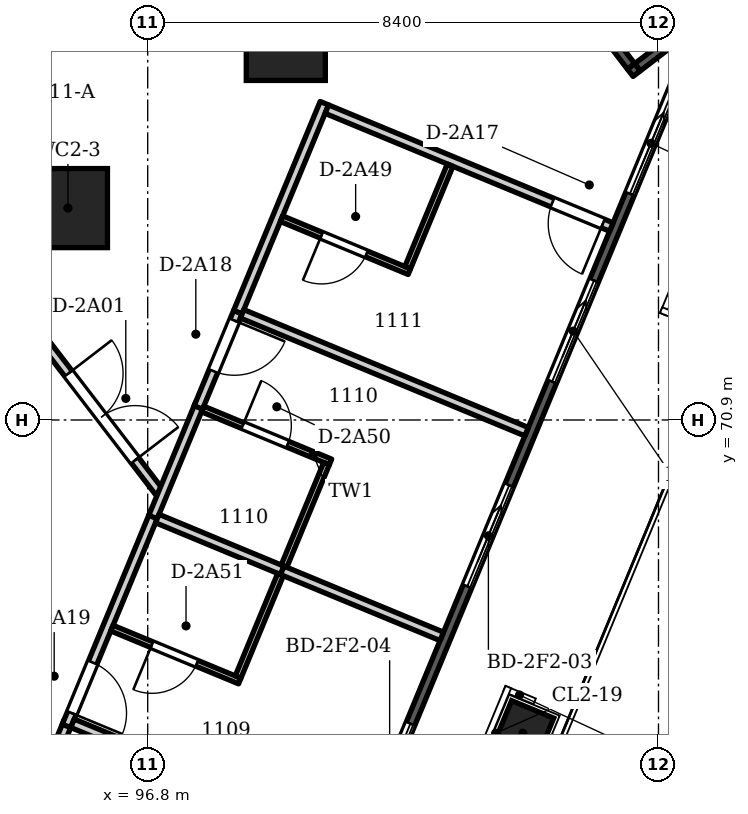
"""IFC4 building model, lengths in metres.
Left out: names, types, materials, properties, quantities, classifications, styles, units other than length and angle.
Written with IfcOpenShell. Run it as: python <this file> out.ifc"""

import sys

from ifc_helpers import new_model, si_unit, direction, frame, frame_2d, origin, origin_2d, place, context, subcontext, project, spatial, polyline, rectangle, circle, outline, extrude, element, fill, save


model = new_model("IFC4")
c1 = context("Model", 3, precision=1e-05, world=origin(), true_north=direction((0.0, 1.0)))
c2 = subcontext(c1, "Body", "Model", "MODEL_VIEW")
j1 = project(units=[si_unit("LENGTHUNIT", "METRE"), si_unit("PLANEANGLEUNIT", "RADIAN")], contexts=[c1])
p1 = place(None, origin())
s1 = spatial("IfcSite", under=j1, at=p1, CompositionType="ELEMENT")
p2 = place(p1, origin())
s2 = spatial("IfcBuilding", under=s1, at=p2, CompositionType="ELEMENT")
p3 = place(p2, frame((0.0, 0.0, 50.4)))
s3 = spatial("IfcBuildingStorey", under=s2, at=p3, CompositionType="ELEMENT", Elevation=50.4)
p4 = place(p3, frame((102.968, 65.749, -0.35), z_axis=(0.0, 0.0, 1.0), x_axis=(0.382683432365, 0.923879532511, 0.0)))
e1 = element("IfcColumn", 1, at=p4, inside=s3, PredefinedType="COLUMN", context=c2, shape_type="SweptSolid", body=[
    extrude(rectangle(XDim=0.85, YDim=0.75, at=origin_2d()), origin(), (0.0, 0.0, 1.0), 3.95),
])
for number, where, z_axis, x_axis in (
    (2, (95.488, 74.385, -0.35), (0.0, 0.0, 1.0), (1.0, 0.0, 0.0)),
    (3, (99.071, 77.134, -0.35), (0.0, 0.0, 1.0), (1.0, 0.0, 0.0)),
):
    element("IfcColumn", number, at=place(p3, frame(where, z_axis=z_axis, x_axis=x_axis)), inside=s3, PredefinedType="COLUMN", context=c2, shape_type="SweptSolid", body=[
        extrude(circle(Radius=0.65, at=origin_2d()), origin(), (0.0, 0.0, 1.0), 3.95),
    ])
p5 = place(p3, frame((104.208, 77.42, 0.0), z_axis=(0.0, 0.0, 1.0), x_axis=(0.608754453805, -0.793358692504, 0.0)))
e4 = element("IfcWall", 4, at=p5, inside=s3, PredefinedType="SOLIDWALL", context=c2, shape_type="SweptSolid", body=[
    extrude(outline(polyline([(0.89, 0.075), (0.0, 0.075), (0.0, -0.075), (0.89, -0.075), (0.89, 0.075)])), origin(), (0.0, 0.0, 1.0), 3.3),
])
p6 = place(p3, frame((104.768, 76.633, 0.0), z_axis=(0.0, 0.0, 1.0), x_axis=(0.793352136239, 0.608762998157, 0.0)))
e5 = element("IfcWall", 5, at=p6, inside=s3, PredefinedType="SOLIDWALL", context=c2, shape_type="SweptSolid", body=[
    extrude(outline(polyline([(0.11, 0.075), (0.11, -0.075), (1.196, -0.075), (1.196, 0.075), (0.11, 0.075)])), origin(), (0.0, 0.0, 1.0), 3.3),
])
p7 = place(p3, frame((105.889, 77.411, 0.0), z_axis=(0.0, 0.0, 1.0), x_axis=(-0.38268395344, -0.923879316675, 0.0)))
e6 = element("IfcWall", 6, at=p7, inside=s3, PredefinedType="SOLIDWALL", context=c2, shape_type="SweptSolid", body=[
    extrude(outline(polyline([(0.149, 0.075), (0.149, -0.075), (47.217, -0.075), (47.217, 0.075), (0.149, 0.075)])), origin(), (0.0, 0.0, 1.0), 3.3),
])
p8 = place(p7, frame((1.222, 0.0, 0.0)))
e7 = element("IfcOpeningElement", 7, at=p8, cuts=e6, PredefinedType="OPENING", context=c2, shape_type="SweptSolid", body=[
    extrude(rectangle(XDim=1.8, YDim=2.6, at=frame_2d((0.9, 1.3))), frame((0.0, 0.085, 0.0), z_axis=(0.0, -1.0, 0.0), x_axis=(1.0, 0.0, 0.0)), (0.0, 0.0, 1.0), 0.17),
])
p9 = place(p7, frame((4.565, 0.0, 0.0)))
e8 = element("IfcOpeningElement", 8, at=p9, cuts=e6, PredefinedType="OPENING", context=c2, shape_type="SweptSolid", body=[
    extrude(rectangle(XDim=1.8, YDim=2.6, at=frame_2d((0.9, 1.3))), frame((0.0, 0.085, 0.0), z_axis=(0.0, -1.0, 0.0), x_axis=(1.0, 0.0, 0.0)), (0.0, 0.0, 1.0), 0.17),
])
p10 = place(p7, frame((8.209, 0.0, 0.0)))
e9 = element("IfcOpeningElement", 9, at=p10, cuts=e6, PredefinedType="OPENING", context=c2, shape_type="SweptSolid", body=[
    extrude(rectangle(XDim=1.8, YDim=2.6, at=frame_2d((0.9, 1.3))), frame((0.0, 0.085, 0.0), z_axis=(0.0, -1.0, 0.0), x_axis=(1.0, 0.0, 0.0)), (0.0, 0.0, 1.0), 0.17),
])
p11 = place(p7, frame((12.453, 0.0, 0.0)))
e10 = element("IfcOpeningElement", 10, at=p11, cuts=e6, PredefinedType="OPENING", context=c2, shape_type="SweptSolid", body=[
    extrude(rectangle(XDim=1.8, YDim=2.6, at=frame_2d((0.9, 1.3))), frame((0.0, 0.085, 0.0), z_axis=(0.0, -1.0, 0.0), x_axis=(1.0, 0.0, 0.0)), (0.0, 0.0, 1.0), 0.17),
])
p12 = place(p7, frame((15.496, 0.0, 0.0)))
e11 = element("IfcOpeningElement", 11, at=p12, cuts=e6, PredefinedType="OPENING", context=c2, shape_type="SweptSolid", body=[
    extrude(rectangle(XDim=1.8, YDim=2.6, at=frame_2d((0.9, 1.3))), frame((0.0, 0.085, 0.0), z_axis=(0.0, -1.0, 0.0), x_axis=(1.0, 0.0, 0.0)), (0.0, 0.0, 1.0), 0.17),
])
p13 = place(p7, frame((18.84, 0.0, 0.15)))
e12 = element("IfcOpeningElement", 12, at=p13, cuts=e6, PredefinedType="OPENING", context=c2, shape_type="SweptSolid", body=[
    extrude(rectangle(XDim=2.4, YDim=2.45, at=frame_2d((1.2, 1.225))), frame((0.0, 0.085, 0.0), z_axis=(0.0, -1.0, 0.0), x_axis=(1.0, 0.0, 0.0)), (0.0, 0.0, 1.0), 0.17),
])
p14 = place(p7, frame((22.783, 0.0, 0.0)))
e13 = element("IfcOpeningElement", 13, at=p14, cuts=e6, PredefinedType="OPENING", context=c2, shape_type="SweptSolid", body=[
    extrude(rectangle(XDim=1.8, YDim=2.6, at=frame_2d((0.9, 1.3))), frame((0.0, 0.085, 0.0), z_axis=(0.0, -1.0, 0.0), x_axis=(1.0, 0.0, 0.0)), (0.0, 0.0, 1.0), 0.17),
])
p15 = place(p7, frame((26.127, 0.0, 0.15)))
e14 = element("IfcOpeningElement", 14, at=p15, cuts=e6, PredefinedType="OPENING", context=c2, shape_type="SweptSolid", body=[
    extrude(rectangle(XDim=2.4, YDim=2.45, at=frame_2d((1.2, 1.225))), frame((0.0, 0.085, 0.0), z_axis=(0.0, -1.0, 0.0), x_axis=(1.0, 0.0, 0.0)), (0.0, 0.0, 1.0), 0.17),
])
p16 = place(p7, frame((30.071, 0.0, 0.0)))
e15 = element("IfcOpeningElement", 15, at=p16, cuts=e6, PredefinedType="OPENING", context=c2, shape_type="SweptSolid", body=[
    extrude(rectangle(XDim=1.8, YDim=2.6, at=frame_2d((0.9, 1.3))), frame((0.0, 0.085, 0.0), z_axis=(0.0, -1.0, 0.0), x_axis=(1.0, 0.0, 0.0)), (0.0, 0.0, 1.0), 0.17),
])
p17 = place(p7, frame((33.114, 0.0, 0.0)))
e16 = element("IfcOpeningElement", 16, at=p17, cuts=e6, PredefinedType="OPENING", context=c2, shape_type="SweptSolid", body=[
    extrude(rectangle(XDim=1.8, YDim=2.6, at=frame_2d((0.9, 1.3))), frame((0.0, 0.085, 0.0), z_axis=(0.0, -1.0, 0.0), x_axis=(1.0, 0.0, 0.0)), (0.0, 0.0, 1.0), 0.17),
])
p18 = place(p7, frame((37.358, 0.0, 0.0)))
e17 = element("IfcOpeningElement", 17, at=p18, cuts=e6, PredefinedType="OPENING", context=c2, shape_type="SweptSolid", body=[
    extrude(rectangle(XDim=1.8, YDim=2.6, at=frame_2d((0.9, 1.3))), frame((0.0, 0.085, 0.0), z_axis=(0.0, -1.0, 0.0), x_axis=(1.0, 0.0, 0.0)), (0.0, 0.0, 1.0), 0.17),
])
p19 = place(p7, frame((41.001, 0.0, 0.0)))
e18 = element("IfcOpeningElement", 18, at=p19, cuts=e6, PredefinedType="OPENING", context=c2, shape_type="SweptSolid", body=[
    extrude(rectangle(XDim=1.8, YDim=2.6, at=frame_2d((0.9, 1.3))), frame((0.0, 0.085, 0.0), z_axis=(0.0, -1.0, 0.0), x_axis=(1.0, 0.0, 0.0)), (0.0, 0.0, 1.0), 0.17),
])
p20 = place(p7, frame((44.345, 0.0, 0.0)))
e19 = element("IfcOpeningElement", 19, at=p20, cuts=e6, PredefinedType="OPENING", context=c2, shape_type="SweptSolid", body=[
    extrude(rectangle(XDim=1.8, YDim=2.6, at=frame_2d((0.9, 1.3))), frame((0.0, 0.085, 0.0), z_axis=(0.0, -1.0, 0.0), x_axis=(1.0, 0.0, 0.0)), (0.0, 0.0, 1.0), 0.17),
])
p21 = place(p3, origin())
e20 = element("IfcWall", 20, at=p21, inside=s3, PredefinedType="PARAPET", context=c2, shape_type="SweptSolid", body=[
    extrude(outline(polyline([(97.885, 51.908), (112.536, 77.285), (112.189, 77.285), (98.764, 54.032), (97.885, 51.908)])), origin(), (0.0, 0.0, 1.0), 1.1),
])
p22 = place(p3, frame((91.474, 76.906, 0.0), z_axis=(0.0, 0.0, 1.0), x_axis=(0.608691769464, -0.793406787081, 0.0)))
e21 = element("IfcWall", 21, at=p22, inside=s3, PredefinedType="PARTITIONING", context=c2, shape_type="SweptSolid", body=[
    extrude(rectangle(XDim=9.059, YDim=0.15, at=frame_2d((4.53, 0.0))), origin(), (0.0, 0.0, 1.0), 2.75),
])
p23 = place(p22, frame((6.606, 0.0, 0.0)))
e22 = element("IfcOpeningElement", 22, at=p23, cuts=e21, PredefinedType="OPENING", context=c2, shape_type="SweptSolid", body=[
    extrude(rectangle(XDim=1.8, YDim=2.1, at=frame_2d((0.9, 1.05))), frame((0.0, 0.085, 0.0), z_axis=(0.0, -1.0, 0.0), x_axis=(1.0, 0.0, 0.0)), (0.0, 0.0, 1.0), 0.17),
])
p24 = place(p22, frame((0.554, 0.0, 0.0)))
e23 = element("IfcOpeningElement", 23, at=p24, cuts=e21, PredefinedType="OPENING", context=c2, shape_type="SweptSolid", body=[
    extrude(rectangle(XDim=0.8, YDim=2.1, at=frame_2d((0.4, 1.05))), frame((0.0, 0.085, 0.0), z_axis=(0.0, -1.0, 0.0), x_axis=(1.0, 0.0, 0.0)), (0.0, 0.0, 1.0), 0.17),
])
p25 = place(p3, frame((94.845, 64.373, 0.0), z_axis=(0.0, 0.0, 1.0), x_axis=(0.382668597728, 0.92388567708, 0.0)))
e24 = element("IfcWall", 24, at=p25, inside=s3, PredefinedType="PARTITIONING", context=c2, shape_type="SweptSolid", body=[
    extrude(rectangle(XDim=1.701, YDim=0.15, at=frame_2d((0.851, 0.0))), origin(), (0.0, 0.0, 1.0), 3.3),
])
p26 = place(p25, frame((0.203, 0.0, 0.0)))
e25 = element("IfcOpeningElement", 25, at=p26, cuts=e24, PredefinedType="OPENING", context=c2, shape_type="SweptSolid", body=[
    extrude(rectangle(XDim=0.9, YDim=2.1, at=frame_2d((0.45, 1.05))), frame((0.0, 0.085, 0.0), z_axis=(0.0, -1.0, 0.0), x_axis=(1.0, 0.0, 0.0)), (0.0, 0.0, 1.0), 0.17),
])
p27 = place(p3, frame((95.464, 65.868, 0.0), z_axis=(0.0, 0.0, 1.0), x_axis=(0.382444409481, 0.923978502811, 0.0)))
e26 = element("IfcWall", 26, at=p27, inside=s3, PredefinedType="PARTITIONING", context=c2, shape_type="SweptSolid", body=[
    extrude(rectangle(XDim=3.803, YDim=0.15, at=frame_2d((1.901, 0.0))), origin(), (0.0, 0.0, 1.0), 3.3),
])
p28 = place(p27, frame((0.229, 0.0, 0.0)))
e27 = element("IfcOpeningElement", 27, at=p28, cuts=e26, PredefinedType="OPENING", context=c2, shape_type="SweptSolid", body=[
    extrude(rectangle(XDim=0.9, YDim=2.1, at=frame_2d((0.45, 1.05))), frame((0.0, 0.085, 0.0), z_axis=(0.0, -1.0, 0.0), x_axis=(1.0, 0.0, 0.0)), (0.0, 0.0, 1.0), 0.17),
])
p29 = place(p3, frame((95.563, 65.912, 0.0), z_axis=(0.0, 0.0, 1.0), x_axis=(0.923879340067, -0.382683896966, 0.0)))
e28 = element("IfcWall", 28, at=p29, inside=s3, PredefinedType="PARTITIONING", context=c2, shape_type="SweptSolid", body=[
    extrude(rectangle(XDim=5.064, YDim=0.15, at=frame_2d((2.532, 0.0))), origin(), (0.0, 0.0, 1.0), 3.3),
])
p30 = place(p3, frame((96.211, 67.477, 0.0), z_axis=(0.0, 0.0, 1.0), x_axis=(0.923931833824, -0.382557141415, 0.0)))
e29 = element("IfcWall", 29, at=p30, inside=s3, PredefinedType="PARTITIONING", context=c2, shape_type="SweptSolid", body=[
    extrude(rectangle(XDim=2.275, YDim=0.1, at=frame_2d((1.138, 0.0))), origin(), (0.0, 0.0, 1.0), 3.3),
])
p31 = place(p30, frame((0.712, 0.0, 0.0)))
e30 = element("IfcOpeningElement", 30, at=p31, cuts=e29, PredefinedType="OPENING", context=c2, shape_type="SweptSolid", body=[
    extrude(rectangle(XDim=0.8, YDim=2.1, at=frame_2d((0.4, 1.05))), frame((0.0, 0.06, 0.0), z_axis=(0.0, -1.0, 0.0), x_axis=(1.0, 0.0, 0.0)), (0.0, 0.0, 1.0), 0.12),
])
p32 = place(p3, frame((96.887, 69.304, 0.0), z_axis=(0.0, 0.0, 1.0), x_axis=(0.382516455335, 0.923948678985, 0.0)))
e31 = element("IfcWall", 31, at=p32, inside=s3, PredefinedType="PARTITIONING", context=c2, shape_type="SweptSolid", body=[
    extrude(rectangle(XDim=2.008, YDim=0.15, at=frame_2d((1.004, 0.0))), origin(), (0.0, 0.0, 1.0), 3.3),
])
p33 = place(p3, frame((96.957, 69.279, 0.0), z_axis=(0.0, 0.0, 1.0), x_axis=(0.923750633898, -0.382994473033, 0.0)))
e32 = element("IfcWall", 32, at=p33, inside=s3, PredefinedType="PARTITIONING", context=c2, shape_type="SweptSolid", body=[
    extrude(rectangle(XDim=2.225, YDim=0.15, at=frame_2d((1.113, 0.0))), origin(), (0.0, 0.0, 1.0), 3.3),
])
p34 = place(p3, frame((97.633, 71.106, 0.0), z_axis=(0.0, 0.0, 1.0), x_axis=(0.382868343203, 0.923802918253, 0.0)))
e33 = element("IfcWall", 33, at=p34, inside=s3, PredefinedType="PARTITIONING", context=c2, shape_type="SweptSolid", body=[
    extrude(rectangle(XDim=1.698, YDim=0.15, at=frame_2d((0.849, 0.0))), origin(), (0.0, 0.0, 1.0), 3.3),
])
p35 = place(p34, frame((0.647, 0.0, 0.0)))
e34 = element("IfcOpeningElement", 34, at=p35, cuts=e33, PredefinedType="OPENING", context=c2, shape_type="SweptSolid", body=[
    extrude(rectangle(XDim=0.9, YDim=2.1, at=frame_2d((0.45, 1.05))), frame((0.0, 0.085, 0.0), z_axis=(0.0, -1.0, 0.0), x_axis=(1.0, 0.0, 0.0)), (0.0, 0.0, 1.0), 0.17),
])
p36 = place(p3, frame((97.704, 71.08, 0.0), z_axis=(0.0, 0.0, 1.0), x_axis=(0.923916126796, -0.382595073996, 0.0)))
e35 = element("IfcWall", 35, at=p36, inside=s3, PredefinedType="PARTITIONING", context=c2, shape_type="SweptSolid", body=[
    extrude(rectangle(XDim=2.275, YDim=0.1, at=frame_2d((1.137, 0.0))), origin(), (0.0, 0.0, 1.0), 3.3),
])
p37 = place(p36, frame((0.712, 0.0, 0.0)))
e36 = element("IfcOpeningElement", 36, at=p37, cuts=e35, PredefinedType="OPENING", context=c2, shape_type="SweptSolid", body=[
    extrude(rectangle(XDim=0.8, YDim=2.1, at=frame_2d((0.4, 1.05))), frame((0.0, 0.06, 0.0), z_axis=(0.0, -1.0, 0.0), x_axis=(1.0, 0.0, 0.0)), (0.0, 0.0, 1.0), 0.12),
])
p38 = place(p3, frame((98.286, 66.672, 0.0), z_axis=(0.0, 0.0, 1.0), x_axis=(0.382714221705, 0.923866778548, 0.0)))
e37 = element("IfcWall", 37, at=p38, inside=s3, PredefinedType="PARTITIONING", context=c2, shape_type="SweptSolid", body=[
    extrude(rectangle(XDim=1.824, YDim=0.1, at=frame_2d((0.912, 0.0))), origin(), (0.0, 0.0, 1.0), 3.3),
])
p39 = place(p3, frame((98.283, 72.674, 0.0), z_axis=(0.0, 0.0, 1.0), x_axis=(0.382661068861, 0.923888795461, 0.0)))
e38 = element("IfcWall", 38, at=p39, inside=s3, PredefinedType="PARTITIONING", context=c2, shape_type="SweptSolid", body=[
    extrude(rectangle(XDim=3.718, YDim=0.15, at=frame_2d((1.859, 0.0))), origin(), (0.0, 0.0, 1.0), 3.3),
])
p40 = place(p3, frame((98.352, 72.645, 0.0), z_axis=(0.0, 0.0, 1.0), x_axis=(0.923879340067, -0.382683896966, 0.0)))
e39 = element("IfcWall", 39, at=p40, inside=s3, PredefinedType="PARTITIONING", context=c2, shape_type="SweptSolid", body=[
    extrude(rectangle(XDim=5.064, YDim=0.15, at=frame_2d((2.532, 0.0))), origin(), (0.0, 0.0, 1.0), 3.3),
])
p41 = place(p3, frame((99.0, 74.21, 0.0), z_axis=(0.0, 0.0, 1.0), x_axis=(0.92378006954, -0.382923469012, 0.0)))
e40 = element("IfcWall", 40, at=p41, inside=s3, PredefinedType="PARTITIONING", context=c2, shape_type="SweptSolid", body=[
    extrude(rectangle(XDim=2.275, YDim=0.1, at=frame_2d((1.138, 0.0))), origin(), (0.0, 0.0, 1.0), 3.3),
])
p42 = place(p41, frame((0.713, 0.0, 0.0)))
e41 = element("IfcOpeningElement", 41, at=p42, cuts=e40, PredefinedType="OPENING", context=c2, shape_type="SweptSolid", body=[
    extrude(rectangle(XDim=0.8, YDim=2.1, at=frame_2d((0.4, 1.05))), frame((0.0, 0.06, 0.0), z_axis=(0.0, -1.0, 0.0), x_axis=(1.0, 0.0, 0.0)), (0.0, 0.0, 1.0), 0.12),
])
p43 = place(p3, frame((99.042, 68.496, 0.0), z_axis=(0.0, 0.0, 1.0), x_axis=(0.382981625731, 0.923755960388, 0.0)))
e42 = element("IfcWall", 42, at=p43, inside=s3, PredefinedType="PARTITIONING", context=c2, shape_type="SweptSolid", body=[
    extrude(rectangle(XDim=1.826, YDim=0.1, at=frame_2d((0.913, 0.0))), origin(), (0.0, 0.0, 1.0), 3.3),
])
p44 = place(p3, frame((99.013, 68.427, 0.0), z_axis=(0.0, 0.0, 1.0), x_axis=(0.923980158274, -0.382440409889, 0.0)))
e43 = element("IfcWall", 43, at=p44, inside=s3, PredefinedType="PARTITIONING", context=c2, shape_type="SweptSolid", body=[
    extrude(rectangle(XDim=2.839, YDim=0.15, at=frame_2d((1.419, 0.0))), origin(), (0.0, 0.0, 1.0), 3.3),
])
p45 = place(p3, frame((99.746, 76.011, 0.0), z_axis=(0.0, 0.0, 1.0), x_axis=(0.923879340067, -0.382683896966, 0.0)))
e44 = element("IfcWall", 44, at=p45, inside=s3, PredefinedType="PARTITIONING", context=c2, shape_type="SweptSolid", body=[
    extrude(rectangle(XDim=5.064, YDim=0.15, at=frame_2d((2.532, 0.0))), origin(), (0.0, 0.0, 1.0), 3.3),
])
p46 = place(p45, frame((4.014, 0.0, 0.0)))
e45 = element("IfcOpeningElement", 45, at=p46, cuts=e44, PredefinedType="OPENING", context=c2, shape_type="SweptSolid", body=[
    extrude(rectangle(XDim=0.9, YDim=2.1, at=frame_2d((0.45, 1.05))), frame((0.0, 0.085, 0.0), z_axis=(0.0, -1.0, 0.0), x_axis=(1.0, 0.0, 0.0)), (0.0, 0.0, 1.0), 0.17),
])
p47 = place(p3, frame((101.075, 73.404, 0.0), z_axis=(0.0, 0.0, 1.0), x_axis=(0.382410862233, 0.923992387656, 0.0)))
e46 = element("IfcWall", 46, at=p47, inside=s3, PredefinedType="PARTITIONING", context=c2, shape_type="SweptSolid", body=[
    extrude(rectangle(XDim=1.825, YDim=0.1, at=frame_2d((0.913, 0.0))), origin(), (0.0, 0.0, 1.0), 3.3),
])
p48 = place(p8, origin())
e47 = element("IfcDoor", 47, at=p48, inside=s3, OperationType="SLIDING_TO_LEFT", PredefinedType="DOOR", context=c2, shape_type="SweptSolid", body=[
    extrude(rectangle(XDim=1.8, YDim=2.6, at=frame_2d((0.9, 1.3))), frame((0.0, 0.025, 0.0), z_axis=(0.0, -1.0, 0.0), x_axis=(1.0, 0.0, 0.0)), (0.0, 0.0, 1.0), 0.05),
])
fill(e7, e47)
p49 = place(p9, origin())
e48 = element("IfcDoor", 48, at=p49, inside=s3, OperationType="SLIDING_TO_LEFT", PredefinedType="DOOR", context=c2, shape_type="SweptSolid", body=[
    extrude(rectangle(XDim=1.8, YDim=2.6, at=frame_2d((0.9, 1.3))), frame((0.0, 0.025, 0.0), z_axis=(0.0, -1.0, 0.0), x_axis=(1.0, 0.0, 0.0)), (0.0, 0.0, 1.0), 0.05),
])
fill(e8, e48)
p50 = place(p10, origin())
e49 = element("IfcDoor", 49, at=p50, inside=s3, OperationType="SLIDING_TO_LEFT", PredefinedType="DOOR", context=c2, shape_type="SweptSolid", body=[
    extrude(rectangle(XDim=1.8, YDim=2.6, at=frame_2d((0.9, 1.3))), frame((0.0, 0.025, 0.0), z_axis=(0.0, -1.0, 0.0), x_axis=(1.0, 0.0, 0.0)), (0.0, 0.0, 1.0), 0.05),
])
fill(e9, e49)
p51 = place(p11, origin())
e50 = element("IfcDoor", 50, at=p51, inside=s3, OperationType="SLIDING_TO_LEFT", PredefinedType="DOOR", context=c2, shape_type="SweptSolid", body=[
    extrude(rectangle(XDim=1.8, YDim=2.6, at=frame_2d((0.9, 1.3))), frame((0.0, 0.025, 0.0), z_axis=(0.0, -1.0, 0.0), x_axis=(1.0, 0.0, 0.0)), (0.0, 0.0, 1.0), 0.05),
])
fill(e10, e50)
p52 = place(p23, origin())
e51 = element("IfcDoor", 51, at=p52, inside=s3, OperationType="DOUBLE_DOOR_DOUBLE_SWING", PredefinedType="DOOR", context=c2, shape_type="SweptSolid", body=[
    extrude(rectangle(XDim=1.8, YDim=2.1, at=frame_2d((0.9, 1.05))), frame((0.0, 0.025, 0.0), z_axis=(0.0, -1.0, 0.0), x_axis=(1.0, 0.0, 0.0)), (0.0, 0.0, 1.0), 0.05),
])
fill(e22, e51)
p53 = place(p46, frame((0.9, 0.0, 0.0), z_axis=(0.0, 0.0, 1.0), x_axis=(-1.0, 0.0, 0.0)))
e52 = element("IfcDoor", 52, at=p53, inside=s3, OperationType="SINGLE_SWING_LEFT", PredefinedType="DOOR", context=c2, shape_type="SweptSolid", body=[
    extrude(rectangle(XDim=0.9, YDim=2.1, at=frame_2d((0.45, 1.05))), frame((0.0, 0.025, 0.0), z_axis=(0.0, -1.0, 0.0), x_axis=(1.0, 0.0, 0.0)), (0.0, 0.0, 1.0), 0.05),
])
fill(e45, e52)
p54 = place(p35, frame((0.9, 0.0, 0.0), z_axis=(0.0, 0.0, 1.0), x_axis=(-1.0, 0.0, 0.0)))
e53 = element("IfcDoor", 53, at=p54, inside=s3, OperationType="SINGLE_SWING_LEFT", PredefinedType="DOOR", context=c2, shape_type="SweptSolid", body=[
    extrude(rectangle(XDim=0.9, YDim=2.1, at=frame_2d((0.45, 1.05))), frame((0.0, 0.025, 0.0), z_axis=(0.0, -1.0, 0.0), x_axis=(1.0, 0.0, 0.0)), (0.0, 0.0, 1.0), 0.05),
])
fill(e34, e53)
p55 = place(p28, frame((0.9, 0.0, 0.0), z_axis=(0.0, 0.0, 1.0), x_axis=(-1.0, 0.0, 0.0)))
e54 = element("IfcDoor", 54, at=p55, inside=s3, OperationType="SINGLE_SWING_RIGHT", PredefinedType="DOOR", context=c2, shape_type="SweptSolid", body=[
    extrude(rectangle(XDim=0.9, YDim=2.1, at=frame_2d((0.45, 1.05))), frame((0.0, 0.025, 0.0), z_axis=(0.0, -1.0, 0.0), x_axis=(1.0, 0.0, 0.0)), (0.0, 0.0, 1.0), 0.05),
])
fill(e27, e54)
p56 = place(p42, frame((0.8, 0.0, 0.0), z_axis=(0.0, 0.0, 1.0), x_axis=(-1.0, 0.0, 0.0)))
e55 = element("IfcDoor", 55, at=p56, inside=s3, OperationType="SINGLE_SWING_RIGHT", PredefinedType="DOOR", context=c2, shape_type="SweptSolid", body=[
    extrude(rectangle(XDim=0.8, YDim=2.1, at=frame_2d((0.4, 1.05))), frame((0.0, 0.025, 0.0), z_axis=(0.0, -1.0, 0.0), x_axis=(1.0, 0.0, 0.0)), (0.0, 0.0, 1.0), 0.05),
])
fill(e41, e55)
p57 = place(p37, origin())
e56 = element("IfcDoor", 56, at=p57, inside=s3, OperationType="SINGLE_SWING_LEFT", PredefinedType="DOOR", context=c2, shape_type="SweptSolid", body=[
    extrude(rectangle(XDim=0.8, YDim=2.1, at=frame_2d((0.4, 1.05))), frame((0.0, 0.025, 0.0), z_axis=(0.0, -1.0, 0.0), x_axis=(1.0, 0.0, 0.0)), (0.0, 0.0, 1.0), 0.05),
])
fill(e36, e56)
p58 = place(p31, frame((0.8, 0.0, 0.0), z_axis=(0.0, 0.0, 1.0), x_axis=(-1.0, 0.0, 0.0)))
e57 = element("IfcDoor", 57, at=p58, inside=s3, OperationType="SINGLE_SWING_RIGHT", PredefinedType="DOOR", context=c2, shape_type="SweptSolid", body=[
    extrude(rectangle(XDim=0.8, YDim=2.1, at=frame_2d((0.4, 1.05))), frame((0.0, 0.025, 0.0), z_axis=(0.0, -1.0, 0.0), x_axis=(1.0, 0.0, 0.0)), (0.0, 0.0, 1.0), 0.05),
])
fill(e30, e57)
save(model, sys.argv[1])
